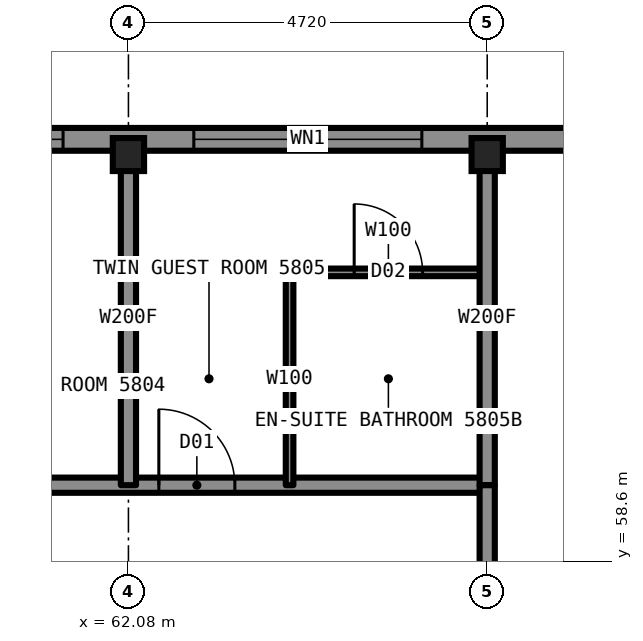
"""IFC4 building model, lengths in metres.
Left out: names, types, materials, properties, quantities, classifications, styles, units other than length and angle.
Written with IfcOpenShell. Run it as: python <this file> out.ifc"""

import sys

from ifc_helpers import new_model, si_unit, direction, frame, frame_2d, origin, origin_2d, place, context, subcontext, project, spatial, rectangle, i_section, extrude, element, fill, save


model = new_model("IFC4")
c1 = context("Model", 3, precision=1e-05, world=origin(), true_north=direction((0.0, 1.0)))
c2 = subcontext(c1, "Body", "Model", "MODEL_VIEW")
j1 = project(units=[si_unit("LENGTHUNIT", "METRE"), si_unit("PLANEANGLEUNIT", "RADIAN")], contexts=[c1])
p1 = place(None, origin())
s1 = spatial("IfcSite", under=j1, at=p1, CompositionType="ELEMENT")
p2 = place(p1, origin())
s2 = spatial("IfcBuilding", under=s1, at=p2, CompositionType="ELEMENT")
p3 = place(p2, frame((0.0, 0.0, 214.3)))
s3 = spatial("IfcBuildingStorey", under=s2, at=p3, CompositionType="ELEMENT", Elevation=214.3)
for number, where, z_axis, x_axis in (
    (1, (62.08, 63.95, 0.0), (0.0, 0.0, 1.0), (1.0, 0.0, 0.0)),
    (2, (66.8, 63.95, 0.0), (0.0, 0.0, 1.0), (1.0, 0.0, 0.0)),
):
    element("IfcColumn", number, at=place(p3, frame(where, z_axis=z_axis, x_axis=x_axis)), inside=s3, PredefinedType="COLUMN", context=c2, shape_type="SweptSolid", body=[
        extrude(i_section(OverallWidth=0.411, OverallDepth=0.434, WebThickness=0.036, FlangeThickness=0.057, at=origin_2d()), origin(), (0.0, 0.0, 1.0), 3.5),
    ])
p4 = place(p3, frame((43.2, 59.6, 0.0), z_axis=(0.0, 0.0, 1.0), x_axis=(1.0, 0.0, 0.0)))
e3 = element("IfcWall", 3, at=p4, inside=s3, PredefinedType="PARTITIONING", context=c2, shape_type="SweptSolid", body=[
    extrude(rectangle(XDim=23.6, YDim=0.2, at=frame_2d((11.8, 0.0))), origin(), (0.0, 0.0, 1.0), 3.33),
])
p5 = place(p4, frame((1.46, 0.0, 0.0)))
e4 = element("IfcOpeningElement", 4, at=p5, cuts=e3, PredefinedType="OPENING", context=c2, shape_type="SweptSolid", body=[
    extrude(rectangle(XDim=1.0, YDim=2.2, at=frame_2d((0.5, 1.1))), frame((0.0, 0.11, 0.0), z_axis=(0.0, -1.0, 0.0), x_axis=(1.0, 0.0, 0.0)), (0.0, 0.0, 1.0), 0.22),
])
p6 = place(p4, frame((6.18, 0.0, 0.0)))
e5 = element("IfcOpeningElement", 5, at=p6, cuts=e3, PredefinedType="OPENING", context=c2, shape_type="SweptSolid", body=[
    extrude(rectangle(XDim=1.0, YDim=2.2, at=frame_2d((0.5, 1.1))), frame((0.0, 0.11, 0.0), z_axis=(0.0, -1.0, 0.0), x_axis=(1.0, 0.0, 0.0)), (0.0, 0.0, 1.0), 0.22),
])
p7 = place(p4, frame((10.9, 0.0, 0.0)))
e6 = element("IfcOpeningElement", 6, at=p7, cuts=e3, PredefinedType="OPENING", context=c2, shape_type="SweptSolid", body=[
    extrude(rectangle(XDim=1.0, YDim=2.2, at=frame_2d((0.5, 1.1))), frame((0.0, 0.11, 0.0), z_axis=(0.0, -1.0, 0.0), x_axis=(1.0, 0.0, 0.0)), (0.0, 0.0, 1.0), 0.22),
])
p8 = place(p4, frame((16.71, 0.0, 0.0)))
e7 = element("IfcOpeningElement", 7, at=p8, cuts=e3, PredefinedType="OPENING", context=c2, shape_type="SweptSolid", body=[
    extrude(rectangle(XDim=1.0, YDim=2.2, at=frame_2d((0.5, 1.1))), frame((0.0, 0.11, 0.0), z_axis=(0.0, -1.0, 0.0), x_axis=(1.0, 0.0, 0.0)), (0.0, 0.0, 1.0), 0.22),
])
p9 = place(p4, frame((19.28, 0.0, 0.0)))
e8 = element("IfcOpeningElement", 8, at=p9, cuts=e3, PredefinedType="OPENING", context=c2, shape_type="SweptSolid", body=[
    extrude(rectangle(XDim=1.0, YDim=2.2, at=frame_2d((0.5, 1.1))), frame((0.0, 0.11, 0.0), z_axis=(0.0, -1.0, 0.0), x_axis=(1.0, 0.0, 0.0)), (0.0, 0.0, 1.0), 0.22),
])
p10 = place(p3, frame((64.2, 62.4, 0.0), z_axis=(0.0, 0.0, 1.0), x_axis=(1.0, 0.0, 0.0)))
e9 = element("IfcWall", 9, at=p10, inside=s3, PredefinedType="PARTITIONING", context=c2, shape_type="SweptSolid", body=[
    extrude(rectangle(XDim=2.6, YDim=0.1, at=frame_2d((1.3, 0.0))), origin(), (0.0, 0.0, 1.0), 3.33),
])
p11 = place(p10, frame((0.85, 0.0, 0.0)))
e10 = element("IfcOpeningElement", 10, at=p11, cuts=e9, PredefinedType="OPENING", context=c2, shape_type="SweptSolid", body=[
    extrude(rectangle(XDim=0.9, YDim=2.1, at=frame_2d((0.45, 1.05))), frame((0.0, 0.06, 0.0), z_axis=(0.0, -1.0, 0.0), x_axis=(1.0, 0.0, 0.0)), (0.0, 0.0, 1.0), 0.12),
])
for number, where, z_axis, x_axis in (
    (11, (66.8, 59.6, 0.0), (0.0, 0.0, 1.0), (0.0, 1.0, 0.0)),
    (12, (62.08, 59.6, 0.0), (0.0, 0.0, 1.0), (0.0, 1.0, 0.0)),
):
    element("IfcWall", number, at=place(p3, frame(where, z_axis=z_axis, x_axis=x_axis)), inside=s3, PredefinedType="PARTITIONING", context=c2, shape_type="SweptSolid", body=[
        extrude(rectangle(XDim=4.4, YDim=0.2, at=frame_2d((2.2, 0.0))), origin(), (0.0, 0.0, 1.0), 2.573),
    ])
p12 = place(p3, frame((64.2, 59.6, 0.0), z_axis=(0.0, 0.0, 1.0), x_axis=(0.0, 1.0, 0.0)))
e13 = element("IfcWall", 13, at=p12, inside=s3, PredefinedType="PARTITIONING", context=c2, shape_type="SweptSolid", body=[
    extrude(rectangle(XDim=2.8, YDim=0.1, at=frame_2d((1.4, 0.0))), origin(), (0.0, 0.0, 1.0), 3.33),
])
p13 = place(p3, frame((68.8, 64.15, 0.0), z_axis=(0.0, 0.0, 1.0), x_axis=(-1.0, 0.0, 0.0)))
e14 = element("IfcWall", 14, at=p13, inside=s3, PredefinedType="SOLIDWALL", context=c2, shape_type="SweptSolid", body=[
    extrude(rectangle(XDim=27.6, YDim=0.3, at=frame_2d((13.8, 0.0))), origin(), (0.0, 0.0, 1.0), 2.63),
])
p14 = place(p13, frame((2.86, 0.0, 0.3)))
e15 = element("IfcOpeningElement", 15, at=p14, cuts=e14, PredefinedType="OPENING", context=c2, shape_type="SweptSolid", body=[
    extrude(rectangle(XDim=3.0, YDim=2.0, at=frame_2d((1.5, 1.0))), frame((0.0, 0.16, 0.0), z_axis=(0.0, -1.0, 0.0), x_axis=(1.0, 0.0, 0.0)), (0.0, 0.0, 1.0), 0.32),
])
p15 = place(p13, frame((7.58, 0.0, 0.3)))
e16 = element("IfcOpeningElement", 16, at=p15, cuts=e14, PredefinedType="OPENING", context=c2, shape_type="SweptSolid", body=[
    extrude(rectangle(XDim=3.0, YDim=2.0, at=frame_2d((1.5, 1.0))), frame((0.0, 0.16, 0.0), z_axis=(0.0, -1.0, 0.0), x_axis=(1.0, 0.0, 0.0)), (0.0, 0.0, 1.0), 0.32),
])
p16 = place(p13, frame((12.3, 0.0, 0.3)))
e17 = element("IfcOpeningElement", 17, at=p16, cuts=e14, PredefinedType="OPENING", context=c2, shape_type="SweptSolid", body=[
    extrude(rectangle(XDim=3.0, YDim=2.0, at=frame_2d((1.5, 1.0))), frame((0.0, 0.16, 0.0), z_axis=(0.0, -1.0, 0.0), x_axis=(1.0, 0.0, 0.0)), (0.0, 0.0, 1.0), 0.32),
])
p17 = place(p13, frame((17.02, 0.0, 0.3)))
e18 = element("IfcOpeningElement", 18, at=p17, cuts=e14, PredefinedType="OPENING", context=c2, shape_type="SweptSolid", body=[
    extrude(rectangle(XDim=3.0, YDim=2.0, at=frame_2d((1.5, 1.0))), frame((0.0, 0.16, 0.0), z_axis=(0.0, -1.0, 0.0), x_axis=(1.0, 0.0, 0.0)), (0.0, 0.0, 1.0), 0.32),
])
p18 = place(p13, frame((21.74, 0.0, 0.3)))
e19 = element("IfcOpeningElement", 19, at=p18, cuts=e14, PredefinedType="OPENING", context=c2, shape_type="SweptSolid", body=[
    extrude(rectangle(XDim=3.0, YDim=2.0, at=frame_2d((1.5, 1.0))), frame((0.0, 0.16, 0.0), z_axis=(0.0, -1.0, 0.0), x_axis=(1.0, 0.0, 0.0)), (0.0, 0.0, 1.0), 0.32),
])
p19 = place(p3, frame((66.8, 56.78, 0.0), z_axis=(0.0, 0.0, 1.0), x_axis=(0.0, 1.0, 0.0)))
e20 = element("IfcWall", 20, at=p19, inside=s3, PredefinedType="PARTITIONING", context=c2, shape_type="SweptSolid", body=[
    extrude(rectangle(XDim=2.82, YDim=0.2, at=frame_2d((1.41, 0.0))), origin(), (0.0, 0.0, 1.0), 2.573),
])
p20 = place(p9, origin())
e21 = element("IfcDoor", 21, at=p20, inside=s3, OperationType="SINGLE_SWING_LEFT", PredefinedType="DOOR", context=c2, shape_type="SweptSolid", body=[
    extrude(rectangle(XDim=1.0, YDim=2.2, at=frame_2d((0.5, 1.1))), frame((0.0, 0.025, 0.0), z_axis=(0.0, -1.0, 0.0), x_axis=(1.0, 0.0, 0.0)), (0.0, 0.0, 1.0), 0.05),
])
fill(e8, e21)
p21 = place(p11, origin())
e22 = element("IfcDoor", 22, at=p21, inside=s3, OperationType="SINGLE_SWING_RIGHT", PredefinedType="DOOR", context=c2, shape_type="SweptSolid", body=[
    extrude(rectangle(XDim=0.9, YDim=2.1, at=frame_2d((0.45, 1.05))), frame((0.0, 0.025, 0.0), z_axis=(0.0, -1.0, 0.0), x_axis=(1.0, 0.0, 0.0)), (0.0, 0.0, 1.0), 0.05),
])
fill(e10, e22)
p22 = place(p14, origin())
e23 = element("IfcWindow", 23, at=p22, inside=s3, PartitioningType="SINGLE_PANEL", PredefinedType="WINDOW", context=c2, shape_type="SweptSolid", body=[
    extrude(rectangle(XDim=3.0, YDim=2.0, at=frame_2d((1.5, 1.0))), frame((0.0, 0.13, 0.0), z_axis=(0.0, -1.0, 0.0), x_axis=(1.0, 0.0, 0.0)), (0.0, 0.0, 1.0), 0.06),
])
fill(e15, e23)
p23 = place(p15, origin())
e24 = element("IfcWindow", 24, at=p23, inside=s3, PartitioningType="SINGLE_PANEL", PredefinedType="WINDOW", context=c2, shape_type="SweptSolid", body=[
    extrude(rectangle(XDim=3.0, YDim=2.0, at=frame_2d((1.5, 1.0))), frame((0.0, 0.13, 0.0), z_axis=(0.0, -1.0, 0.0), x_axis=(1.0, 0.0, 0.0)), (0.0, 0.0, 1.0), 0.06),
])
fill(e16, e24)
save(model, sys.argv[1])
